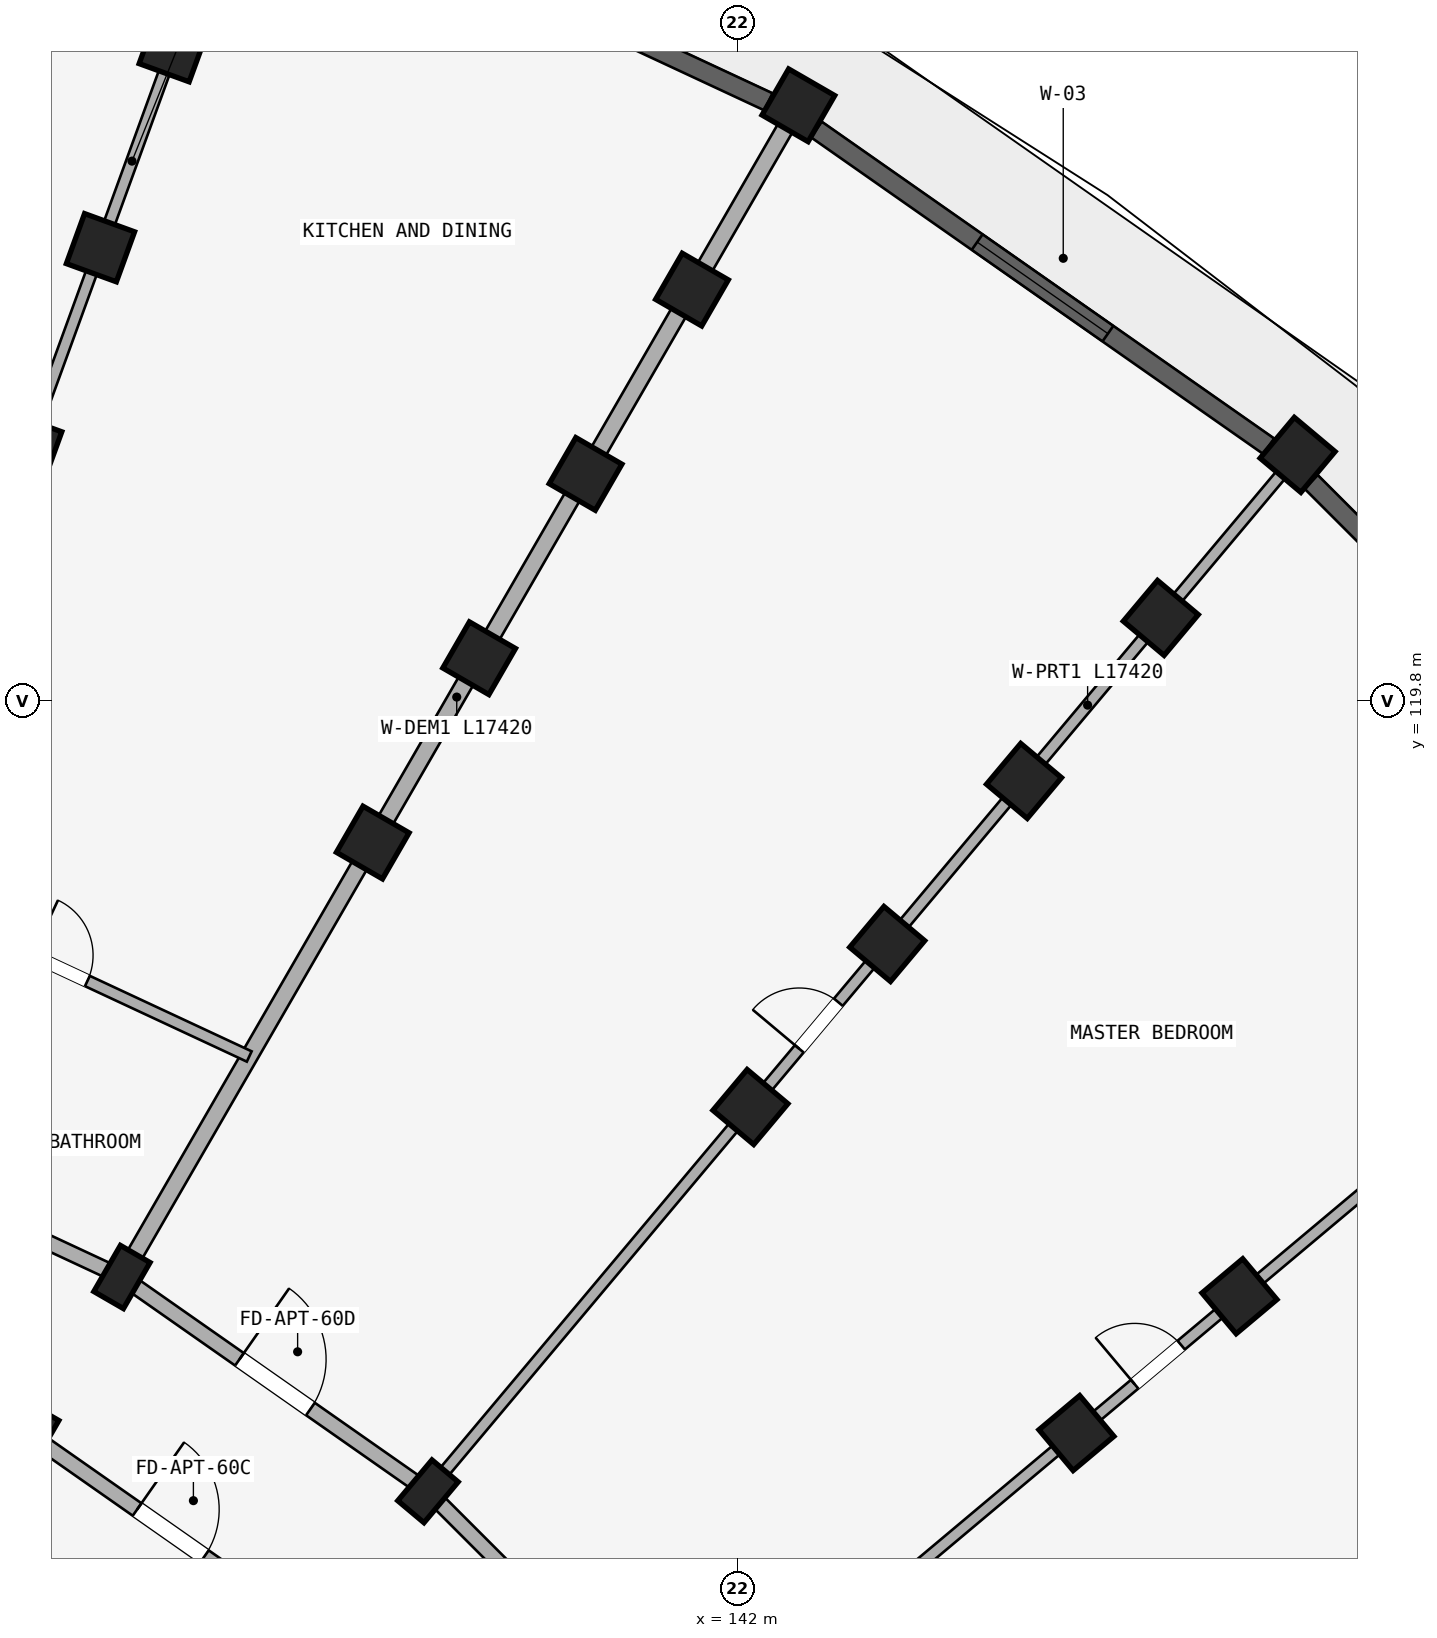
"""IFC4 building model, lengths in metres.
Left out: names, types, materials, properties, quantities, classifications, styles, units other than length and angle.
Written with IfcOpenShell. Run it as: python <this file> out.ifc"""

import sys

from ifc_helpers import new_model, si_unit, direction, frame, frame_2d, origin, origin_2d, place, context, subcontext, project, spatial, rectangle, extrude, element, fill, save


model = new_model("IFC4")
c1 = context("Model", 3, precision=1e-05, world=origin(), true_north=direction((0.0, 1.0)))
c2 = subcontext(c1, "Body", "Model", "MODEL_VIEW")
j1 = project(units=[si_unit("LENGTHUNIT", "METRE"), si_unit("PLANEANGLEUNIT", "RADIAN")], contexts=[c1])
p1 = place(None, origin())
s1 = spatial("IfcSite", under=j1, at=p1, CompositionType="ELEMENT")
p2 = place(p1, origin())
s2 = spatial("IfcBuilding", under=s1, at=p2, CompositionType="ELEMENT")
p3 = place(p2, frame((0.0, 0.0, 24.45)))
s3 = spatial("IfcBuildingStorey", under=s2, at=p3, CompositionType="ELEMENT", Elevation=24.45)
for number, where, z_axis, x_axis in (
    (1, (132.66, 123.132, 0.0), (0.0, 0.0, 1.0), (-0.94, 0.342, 0.0)),
    (2, (133.618, 125.764, 0.0), (0.0, 0.0, 1.0), (-0.94, 0.342, 0.0)),
    (3, (134.575, 128.395, 0.0), (0.0, 0.0, 1.0), (-0.94, 0.342, 0.0)),
):
    element("IfcColumn", number, at=place(p3, frame(where, z_axis=z_axis, x_axis=x_axis)), inside=s3, PredefinedType="COLUMN", context=c2, shape_type="SweptSolid", body=[
        extrude(rectangle(XDim=0.7, YDim=0.7, at=origin_2d()), origin(), (0.0, 0.0, 1.0), 2.93),
    ])
for number, where, z_axis, x_axis in (
    (4, (132.7, 110.144, 0.0), (0.0, 0.0, 1.0), (-0.866, 0.5, 0.0)),
    (5, (133.9, 112.222, 0.0), (0.0, 0.0, 1.0), (-0.866, 0.5, 0.0)),
):
    element("IfcColumn", number, at=place(p3, frame(where, z_axis=z_axis, x_axis=x_axis)), inside=s3, PredefinedType="COLUMN", context=c2, shape_type="SweptSolid", body=[
        extrude(rectangle(XDim=0.45, YDim=0.7, at=origin_2d()), origin(), (0.0, 0.0, 1.0), 2.93),
    ])
for number, where, z_axis, x_axis in (
    (6, (137.2, 117.938, 0.0), (0.0, 0.0, 1.0), (-0.866, 0.5, 0.0)),
    (7, (138.6, 120.363, 0.0), (0.0, 0.0, 1.0), (-0.866, 0.5, 0.0)),
    (8, (140.0, 122.787, 0.0), (0.0, 0.0, 1.0), (-0.866, 0.5, 0.0)),
    (9, (141.4, 125.212, 0.0), (0.0, 0.0, 1.0), (-0.866, 0.5, 0.0)),
    (10, (142.8, 127.637, 0.0), (0.0, 0.0, 1.0), (-0.866, 0.5, 0.0)),
):
    element("IfcColumn", number, at=place(p3, frame(where, z_axis=z_axis, x_axis=x_axis)), inside=s3, PredefinedType="COLUMN", context=c2, shape_type="SweptSolid", body=[
        extrude(rectangle(XDim=0.7, YDim=0.7, at=origin_2d()), origin(), (0.0, 0.0, 1.0), 2.93),
    ])
p4 = place(p3, frame((137.927, 109.402, 0.0), z_axis=(0.0, 0.0, 1.0), x_axis=(-0.766044443119, 0.642787609687, 0.0)))
e11 = element("IfcColumn", 11, at=p4, inside=s3, PredefinedType="COLUMN", context=c2, shape_type="SweptSolid", body=[
    extrude(rectangle(XDim=0.45, YDim=0.7, at=origin_2d()), origin(), (0.0, 0.0, 1.0), 2.93),
])
for number, where, z_axis, x_axis in (
    (12, (142.169, 114.458, 0.0), (0.0, 0.0, 1.0), (-0.766, 0.643, 0.0)),
    (13, (143.969, 116.603, 0.0), (0.0, 0.0, 1.0), (-0.766, 0.643, 0.0)),
    (14, (145.769, 118.748, 0.0), (0.0, 0.0, 1.0), (-0.766, 0.643, 0.0)),
    (15, (147.568, 120.893, 0.0), (0.0, 0.0, 1.0), (-0.766, 0.643, 0.0)),
    (16, (149.368, 123.038, 0.0), (0.0, 0.0, 1.0), (-0.766, 0.643, 0.0)),
    (17, (146.458, 110.169, 0.0), (0.0, 0.0, 1.0), (-0.643, 0.766, 0.0)),
    (18, (148.603, 111.969, 0.0), (0.0, 0.0, 1.0), (-0.643, 0.766, 0.0)),
):
    element("IfcColumn", number, at=place(p3, frame(where, z_axis=z_axis, x_axis=x_axis)), inside=s3, PredefinedType="COLUMN", context=c2, shape_type="SweptSolid", body=[
        extrude(rectangle(XDim=0.7, YDim=0.7, at=origin_2d()), origin(), (0.0, 0.0, 1.0), 2.93),
    ])
p5 = place(p3, frame((129.445, 114.299, 0.0), z_axis=(0.0, 0.0, 1.0), x_axis=(0.906302381024, -0.422629854778, 0.0)))
e19 = element("IfcWall", 19, at=p5, inside=s3, PredefinedType="STANDARD", context=c2, shape_type="SweptSolid", body=[
    extrude(rectangle(XDim=4.915, YDim=0.2, at=frame_2d((2.458, 0.0))), origin(), (0.0, 0.0, 1.0), 2.372),
])
p6 = place(p3, frame((132.7, 110.144, 0.0), z_axis=(0.0, 0.0, 1.0), x_axis=(0.819155404658, -0.573571637217, 0.0)))
e20 = element("IfcWall", 20, at=p6, inside=s3, PredefinedType="STANDARD", context=c2, shape_type="SweptSolid", body=[
    extrude(rectangle(XDim=4.497, YDim=0.2, at=frame_2d((2.249, 0.0))), origin(), (0.0, 0.0, 1.0), 2.372),
])
p7 = place(p6, frame((1.709, 0.0, 0.0)))
e21 = element("IfcOpeningElement", 21, at=p7, cuts=e20, PredefinedType="OPENING", context=c2, shape_type="SweptSolid", body=[
    extrude(rectangle(XDim=1.08, YDim=2.15, at=frame_2d((0.54, 1.075))), frame((0.0, 0.11, 0.0), z_axis=(0.0, -1.0, 0.0), x_axis=(1.0, 0.0, 0.0)), (0.0, 0.0, 1.0), 0.22),
])
p8 = place(p3, frame((133.9, 112.222, 0.0), z_axis=(0.0, 0.0, 1.0), x_axis=(0.819140911474, -0.573592335331, 0.0)))
e22 = element("IfcWall", 22, at=p8, inside=s3, PredefinedType="STANDARD", context=c2, shape_type="SweptSolid", body=[
    extrude(rectangle(XDim=4.916, YDim=0.2, at=frame_2d((2.458, 0.0))), origin(), (0.0, 0.0, 1.0), 2.372),
])
p9 = place(p8, frame((1.888, 0.0, 0.0)))
e23 = element("IfcOpeningElement", 23, at=p9, cuts=e22, PredefinedType="OPENING", context=c2, shape_type="SweptSolid", body=[
    extrude(rectangle(XDim=1.14, YDim=2.15, at=frame_2d((0.57, 1.075))), frame((0.0, 0.11, 0.0), z_axis=(0.0, -1.0, 0.0), x_axis=(1.0, 0.0, 0.0)), (0.0, 0.0, 1.0), 0.22),
])
p10 = place(p3, frame((137.927, 109.402, 0.0), z_axis=(0.0, 0.0, 1.0), x_axis=(0.707106781187, -0.707106781187, 0.0)))
e24 = element("IfcWall", 24, at=p10, inside=s3, PredefinedType="STANDARD", context=c2, shape_type="SweptSolid", body=[
    extrude(rectangle(XDim=4.916, YDim=0.2, at=frame_2d((2.458, 0.0))), origin(), (0.0, 0.0, 1.0), 2.372),
])
p11 = place(p3, frame((129.479, 114.393, 0.0), z_axis=(0.0, 0.0, 1.0), x_axis=(0.342022120477, 0.939691901159, 0.0)))
e25 = element("IfcWall", 25, at=p11, inside=s3, PredefinedType="PARTITIONING", context=c2, shape_type="SweptSolid", body=[
    extrude(rectangle(XDim=17.42, YDim=0.15, at=frame_2d((8.71, 0.0))), origin(), (0.0, 0.0, 1.0), 2.372),
])
p12 = place(p11, frame((7.5, 0.0, 0.0)))
e26 = element("IfcOpeningElement", 26, at=p12, cuts=e25, PredefinedType="OPENING", context=c2, shape_type="SweptSolid", body=[
    extrude(rectangle(XDim=0.8, YDim=2.1, at=frame_2d((0.4, 1.05))), frame((0.0, 0.085, 0.0), z_axis=(0.0, -1.0, 0.0), x_axis=(1.0, 0.0, 0.0)), (0.0, 0.0, 1.0), 0.17),
])
p13 = place(p3, frame((133.95, 112.309, 0.0), z_axis=(0.0, 0.0, 1.0), x_axis=(0.499997843263, 0.866026648973, 0.0)))
e27 = element("IfcWall", 27, at=p13, inside=s3, PredefinedType="STANDARD", context=c2, shape_type="SweptSolid", body=[
    extrude(rectangle(XDim=17.42, YDim=0.22, at=frame_2d((8.71, 0.0))), origin(), (0.0, 0.0, 1.0), 2.372),
])
p14 = place(p3, frame((137.991, 109.479, 0.0), z_axis=(0.0, 0.0, 1.0), x_axis=(0.642784757967, 0.766046835987, 0.0)))
e28 = element("IfcWall", 28, at=p14, inside=s3, PredefinedType="PARTITIONING", context=c2, shape_type="SweptSolid", body=[
    extrude(rectangle(XDim=17.42, YDim=0.15, at=frame_2d((8.71, 0.0))), origin(), (0.0, 0.0, 1.0), 2.372),
])
p15 = place(p14, frame((7.5, 0.0, 0.0)))
e29 = element("IfcOpeningElement", 29, at=p15, cuts=e28, PredefinedType="OPENING", context=c2, shape_type="SweptSolid", body=[
    extrude(rectangle(XDim=0.8, YDim=2.1, at=frame_2d((0.4, 1.05))), frame((0.0, 0.085, 0.0), z_axis=(0.0, -1.0, 0.0), x_axis=(1.0, 0.0, 0.0)), (0.0, 0.0, 1.0), 0.17),
])
p16 = place(p3, frame((141.479, 105.991, 0.0), z_axis=(0.0, 0.0, 1.0), x_axis=(0.766046835987, 0.642784757967, 0.0)))
e30 = element("IfcWall", 30, at=p16, inside=s3, PredefinedType="PARTITIONING", context=c2, shape_type="SweptSolid", body=[
    extrude(rectangle(XDim=17.42, YDim=0.15, at=frame_2d((8.71, 0.0))), origin(), (0.0, 0.0, 1.0), 2.372),
])
p17 = place(p16, frame((7.5, 0.0, 0.0)))
e31 = element("IfcOpeningElement", 31, at=p17, cuts=e30, PredefinedType="OPENING", context=c2, shape_type="SweptSolid", body=[
    extrude(rectangle(XDim=0.8, YDim=2.1, at=frame_2d((0.4, 1.05))), frame((0.0, 0.085, 0.0), z_axis=(0.0, -1.0, 0.0), x_axis=(1.0, 0.0, 0.0)), (0.0, 0.0, 1.0), 0.17),
])
p18 = place(p3, frame((144.309, 101.95, 0.0), z_axis=(0.0, 0.0, 1.0), x_axis=(0.866026648973, 0.499997843263, 0.0)))
e32 = element("IfcWall", 32, at=p18, inside=s3, PredefinedType="STANDARD", context=c2, shape_type="SweptSolid", body=[
    extrude(rectangle(XDim=17.42, YDim=0.22, at=frame_2d((8.71, 0.0))), origin(), (0.0, 0.0, 1.0), 2.372),
])
p19 = place(p3, frame((130.591, 117.447, 0.0), z_axis=(0.0, 0.0, 1.0), x_axis=(0.906302189986, -0.422630264446, 0.0)))
e33 = element("IfcWall", 33, at=p19, inside=s3, PredefinedType="PLUMBINGWALL", context=c2, shape_type="SweptSolid", body=[
    extrude(rectangle(XDim=5.5, YDim=0.15, at=frame_2d((2.75, 0.0))), origin(), (0.0, 0.0, 1.0), 2.372),
])
p20 = place(p19, frame((2.35, 0.0, 0.0)))
e34 = element("IfcOpeningElement", 34, at=p20, cuts=e33, PredefinedType="OPENING", context=c2, shape_type="SweptSolid", body=[
    extrude(rectangle(XDim=0.8, YDim=2.1, at=frame_2d((0.4, 1.05))), frame((0.0, 0.085, 0.0), z_axis=(0.0, -1.0, 0.0), x_axis=(1.0, 0.0, 0.0)), (0.0, 0.0, 1.0), 0.17),
])
p21 = place(p3, frame((135.821, 130.754, 0.0), z_axis=(0.0, 0.0, 1.0), x_axis=(0.90630327107, -0.422627946127, 0.0)))
e35 = element("IfcWall", 35, at=p21, inside=s3, PredefinedType="STANDARD", context=c2, shape_type="SweptSolid", body=[
    extrude(rectangle(XDim=7.267, YDim=0.25, at=frame_2d((3.633, 0.0))), origin(), (0.0, 0.0, 1.0), 2.372),
])
p22 = place(p21, frame((2.733, 0.0, 0.522)))
e36 = element("IfcOpeningElement", 36, at=p22, cuts=e35, PredefinedType="OPENING", context=c2, shape_type="SweptSolid", body=[
    extrude(rectangle(XDim=1.8, YDim=1.65, at=frame_2d((0.9, 0.825))), frame((0.0, 0.135, 0.0), z_axis=(0.0, -1.0, 0.0), x_axis=(1.0, 0.0, 0.0)), (0.0, 0.0, 1.0), 0.27),
])
p23 = place(p3, frame((143.036, 127.319, 0.0), z_axis=(0.0, 0.0, 1.0), x_axis=(0.819159308599, -0.573566061701, 0.0)))
e37 = element("IfcWall", 37, at=p23, inside=s3, PredefinedType="STANDARD", context=c2, shape_type="SweptSolid", body=[
    extrude(rectangle(XDim=7.267, YDim=0.25, at=frame_2d((3.633, 0.0))), origin(), (0.0, 0.0, 1.0), 2.372),
])
p24 = place(p23, frame((2.583, 0.0, 0.372)))
e38 = element("IfcOpeningElement", 38, at=p24, cuts=e37, PredefinedType="OPENING", context=c2, shape_type="SweptSolid", body=[
    extrude(rectangle(XDim=2.1, YDim=1.8, at=frame_2d((1.05, 0.9))), frame((0.0, 0.135, 0.0), z_axis=(0.0, -1.0, 0.0), x_axis=(1.0, 0.0, 0.0)), (0.0, 0.0, 1.0), 0.27),
])
p25 = place(p3, frame((149.546, 122.684, 0.0), z_axis=(0.0, 0.0, 1.0), x_axis=(0.707106781187, -0.707106781187, 0.0)))
e39 = element("IfcWall", 39, at=p25, inside=s3, PredefinedType="STANDARD", context=c2, shape_type="SweptSolid", body=[
    extrude(rectangle(XDim=7.267, YDim=0.25, at=frame_2d((3.633, 0.0))), origin(), (0.0, 0.0, 1.0), 2.372),
])
p26 = place(p25, frame((4.766, 0.0, 0.322)))
e40 = element("IfcOpeningElement", 40, at=p26, cuts=e39, PredefinedType="OPENING", context=c2, shape_type="SweptSolid", body=[
    extrude(rectangle(XDim=1.2, YDim=1.5, at=frame_2d((0.6, 0.75))), frame((0.0, 0.135, 0.0), z_axis=(0.0, -1.0, 0.0), x_axis=(1.0, 0.0, 0.0)), (0.0, 0.0, 1.0), 0.27),
])
p27 = place(p25, frame((1.943, 0.0, 0.0)))
e41 = element("IfcOpeningElement", 41, at=p27, cuts=e39, PredefinedType="OPENING", context=c2, shape_type="SweptSolid", body=[
    extrude(rectangle(XDim=1.2, YDim=2.15, at=frame_2d((0.6, 1.075))), frame((0.0, 0.135, 0.0), z_axis=(0.0, -1.0, 0.0), x_axis=(1.0, 0.0, 0.0)), (0.0, 0.0, 1.0), 0.27),
])
p28 = place(p24, origin())
e42 = element("IfcWindow", 42, at=p28, inside=s3, PartitioningType="TRIPLE_PANEL_VERTICAL", PredefinedType="WINDOW", context=c2, shape_type="SweptSolid", body=[
    extrude(rectangle(XDim=2.1, YDim=1.8, at=frame_2d((1.05, 0.9))), frame((0.0, 0.03, 0.0), z_axis=(0.0, -1.0, 0.0), x_axis=(1.0, 0.0, 0.0)), (0.0, 0.0, 1.0), 0.06),
])
fill(e38, e42)
p29 = place(p15, frame((0.8, 0.0, 0.0), z_axis=(0.0, 0.0, 1.0), x_axis=(-1.0, 0.0, 0.0)))
e43 = element("IfcDoor", 43, at=p29, inside=s3, OperationType="SINGLE_SWING_RIGHT", PredefinedType="DOOR", context=c2, shape_type="SweptSolid", body=[
    extrude(rectangle(XDim=0.8, YDim=2.1, at=frame_2d((0.4, 1.05))), frame((0.0, 0.025, 0.0), z_axis=(0.0, -1.0, 0.0), x_axis=(1.0, 0.0, 0.0)), (0.0, 0.0, 1.0), 0.05),
])
fill(e29, e43)
p30 = place(p17, origin())
e44 = element("IfcDoor", 44, at=p30, inside=s3, OperationType="SINGLE_SWING_LEFT", PredefinedType="DOOR", context=c2, shape_type="SweptSolid", body=[
    extrude(rectangle(XDim=0.8, YDim=2.1, at=frame_2d((0.4, 1.05))), frame((0.0, 0.025, 0.0), z_axis=(0.0, -1.0, 0.0), x_axis=(1.0, 0.0, 0.0)), (0.0, 0.0, 1.0), 0.05),
])
fill(e31, e44)
p31 = place(p20, origin())
e45 = element("IfcDoor", 45, at=p31, inside=s3, OperationType="SINGLE_SWING_LEFT", PredefinedType="DOOR", context=c2, shape_type="SweptSolid", body=[
    extrude(rectangle(XDim=0.8, YDim=2.1, at=frame_2d((0.4, 1.05))), frame((0.0, 0.025, 0.0), z_axis=(0.0, -1.0, 0.0), x_axis=(1.0, 0.0, 0.0)), (0.0, 0.0, 1.0), 0.05),
])
fill(e34, e45)
p32 = place(p9, frame((1.14, 0.0, 0.0), z_axis=(0.0, 0.0, 1.0), x_axis=(-1.0, 0.0, 0.0)))
e46 = element("IfcDoor", 46, at=p32, inside=s3, OperationType="SINGLE_SWING_RIGHT", PredefinedType="DOOR", context=c2, shape_type="SweptSolid", body=[
    extrude(rectangle(XDim=1.14, YDim=2.15, at=frame_2d((0.57, 1.075))), frame((0.0, 0.025, 0.0), z_axis=(0.0, -1.0, 0.0), x_axis=(1.0, 0.0, 0.0)), (0.0, 0.0, 1.0), 0.05),
])
fill(e23, e46)
p33 = place(p7, frame((1.08, 0.0, 0.0), z_axis=(0.0, 0.0, 1.0), x_axis=(-1.0, 0.0, 0.0)))
e47 = element("IfcDoor", 47, at=p33, inside=s3, OperationType="SINGLE_SWING_RIGHT", PredefinedType="DOOR", context=c2, shape_type="SweptSolid", body=[
    extrude(rectangle(XDim=1.08, YDim=2.15, at=frame_2d((0.54, 1.075))), frame((0.0, 0.025, 0.0), z_axis=(0.0, -1.0, 0.0), x_axis=(1.0, 0.0, 0.0)), (0.0, 0.0, 1.0), 0.05),
])
fill(e21, e47)
save(model, sys.argv[1])
